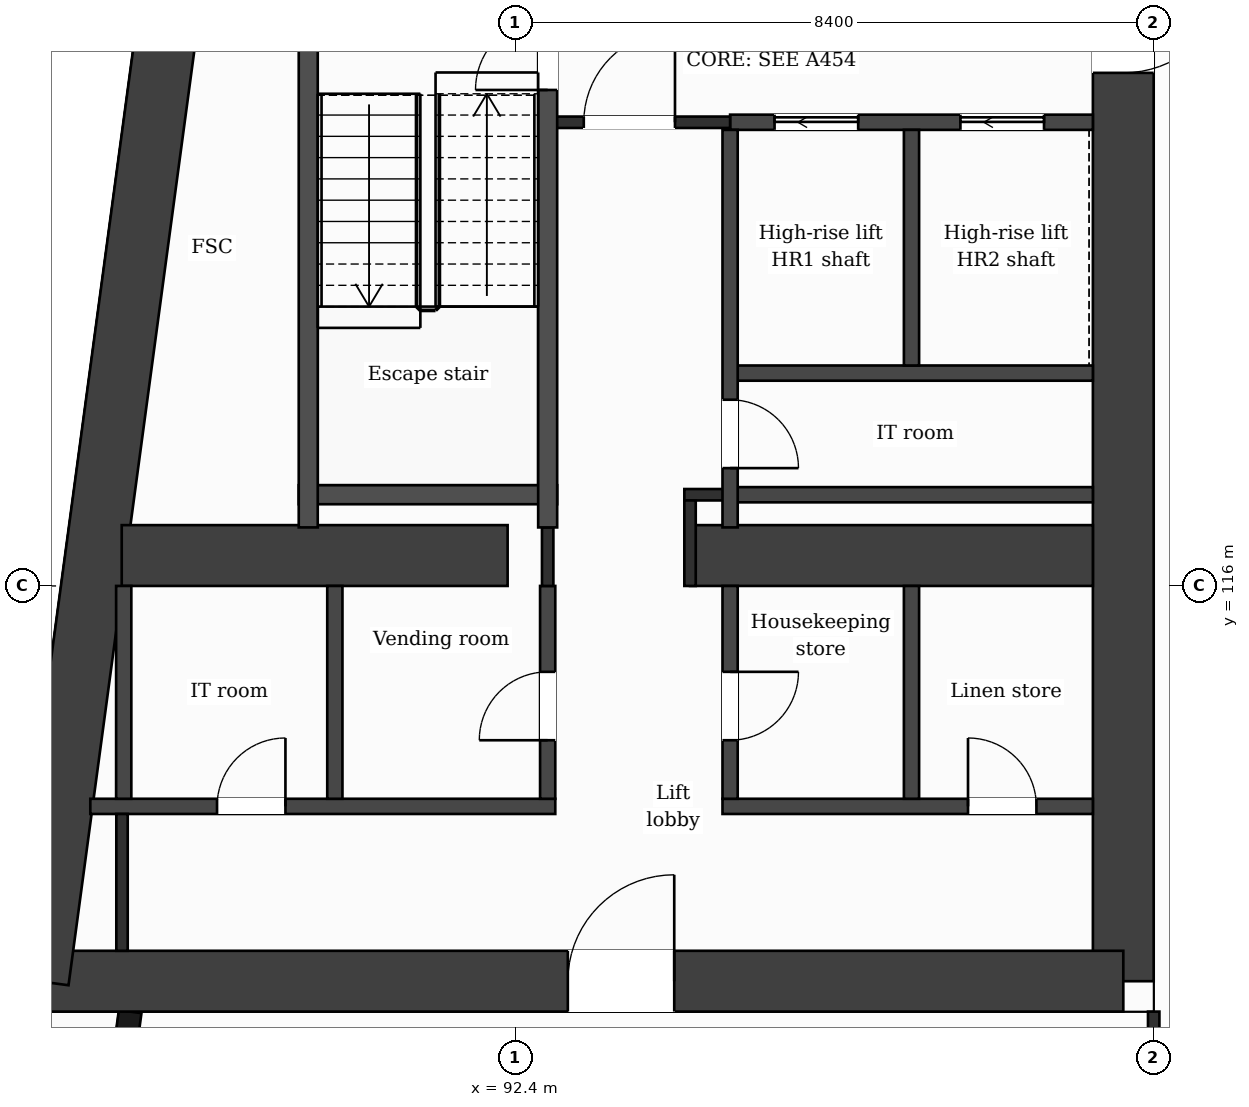
"""IFC4 building model, lengths in metres.
Left out: names, types, materials, properties, quantities, classifications, styles, units other than length and angle.
Written with IfcOpenShell. Run it as: python <this file> out.ifc"""

import sys

from ifc_helpers import new_model, si_unit, direction, frame, frame_2d, origin, place, context, subcontext, project, spatial, rectangle, extrude, element, fill, save


model = new_model("IFC4")
c1 = context("Model", 3, precision=1e-05, world=origin(), true_north=direction((0.0, 1.0)))
c2 = subcontext(c1, "Body", "Model", "MODEL_VIEW")
j1 = project(units=[si_unit("LENGTHUNIT", "METRE"), si_unit("PLANEANGLEUNIT", "RADIAN")], contexts=[c1])
p1 = place(None, origin())
s1 = spatial("IfcSite", under=j1, at=p1, CompositionType="ELEMENT")
p2 = place(p1, origin())
s2 = spatial("IfcBuilding", under=s1, at=p2, CompositionType="ELEMENT")
p3 = place(p2, frame((0.0, 0.0, 220.7)))
s3 = spatial("IfcBuildingStorey", under=s2, at=p3, CompositionType="ELEMENT", Elevation=220.7)
p4 = place(p3, frame((100.4, 132.0, 0.0), z_axis=(0.0, 0.0, 1.0), x_axis=(0.0, -1.0, 0.0)))
e1 = element("IfcWall", 1, at=p4, inside=s3, PredefinedType="SHEAR", context=c2, shape_type="SweptSolid", body=[
    extrude(rectangle(XDim=21.2, YDim=0.8, at=frame_2d((10.6, 0.0))), origin(), (0.0, 0.0, 1.0), 3.7),
])
p5 = place(p4, frame((7.85, 0.0, 0.0)))
e2 = element("IfcOpeningElement", 2, at=p5, cuts=e1, PredefinedType="OPENING", context=c2, shape_type="SweptSolid", body=[
    extrude(rectangle(XDim=1.4, YDim=2.1, at=frame_2d((0.7, 1.05))), frame((0.0, 0.41, 0.0), z_axis=(0.0, -1.0, 0.0), x_axis=(1.0, 0.0, 0.0)), (0.0, 0.0, 1.0), 0.82),
])
p6 = place(p3, frame((100.4, 110.8, 0.0), z_axis=(0.0, 0.0, 1.0), x_axis=(-1.0, 0.0, 0.0)))
e3 = element("IfcWall", 3, at=p6, inside=s3, PredefinedType="SHEAR", context=c2, shape_type="SweptSolid", body=[
    extrude(rectangle(XDim=14.273, YDim=0.8, at=frame_2d((7.137, 0.0))), origin(), (0.0, 0.0, 1.0), 3.7),
])
p7 = place(p6, frame((5.908, 0.0, 0.0)))
e4 = element("IfcOpeningElement", 4, at=p7, cuts=e3, PredefinedType="OPENING", context=c2, shape_type="SweptSolid", body=[
    extrude(rectangle(XDim=1.4, YDim=2.1, at=frame_2d((0.7, 1.05))), frame((0.0, 0.41, 0.0), z_axis=(0.0, -1.0, 0.0), x_axis=(1.0, 0.0, 0.0)), (0.0, 0.0, 1.0), 0.82),
])
p8 = place(p3, frame((86.127, 110.8, 0.0), z_axis=(0.0, 0.0, 1.0), x_axis=(0.133408347329, 0.991061154956, 0.0)))
e5 = element("IfcWall", 5, at=p8, inside=s3, PredefinedType="SHEAR", context=c2, shape_type="SweptSolid", body=[
    extrude(rectangle(XDim=21.391, YDim=0.8, at=frame_2d((10.696, 0.0))), origin(), (0.0, 0.0, 1.0), 3.7),
])
p9 = place(p3, frame((87.223, 116.4, 0.0), z_axis=(0.0, 0.0, 1.0), x_axis=(1.0, 0.0, 0.0)))
e6 = element("IfcWall", 6, at=p9, inside=s3, PredefinedType="SHEAR", context=c2, shape_type="SweptSolid", body=[
    extrude(rectangle(XDim=5.077, YDim=0.8, at=frame_2d((2.539, 0.0))), origin(), (0.0, 0.0, 1.0), 3.7),
])
p10 = place(p3, frame((94.7, 116.4, 0.0), z_axis=(0.0, 0.0, 1.0), x_axis=(1.0, 0.0, 0.0)))
e7 = element("IfcWall", 7, at=p10, inside=s3, PredefinedType="SHEAR", context=c2, shape_type="SweptSolid", body=[
    extrude(rectangle(XDim=5.3, YDim=0.8, at=frame_2d((2.65, 0.0))), origin(), (0.0, 0.0, 1.0), 3.7),
])
p11 = place(p3, frame((87.334, 110.4, 0.0), z_axis=(0.0, 0.0, 1.0), x_axis=(-0.133437175554, -0.991057273915, 0.0)))
e8 = element("IfcWall", 8, at=p11, inside=s3, PredefinedType="SOLIDWALL", context=c2, shape_type="SweptSolid", body=[
    extrude(rectangle(XDim=6.781, YDim=0.3, at=frame_2d((3.39, 0.0))), origin(), (0.0, 0.0, 1.0), 3.38),
])
p12 = place(p11, frame((1.418, 0.0, 0.0)))
e9 = element("IfcOpeningElement", 9, at=p12, cuts=e8, PredefinedType="OPENING", context=c2, shape_type="SweptSolid", body=[
    extrude(rectangle(XDim=1.2, YDim=2.4, at=frame_2d((0.6, 1.2))), frame((0.0, 0.16, 0.0), z_axis=(0.0, -1.0, 0.0), x_axis=(1.0, 0.0, 0.0)), (0.0, 0.0, 1.0), 0.32),
])
p13 = place(p11, frame((4.758, 0.0, 0.9)))
e10 = element("IfcOpeningElement", 10, at=p13, cuts=e8, PredefinedType="OPENING", context=c2, shape_type="SweptSolid", body=[
    extrude(rectangle(XDim=1.2, YDim=2.1, at=frame_2d((0.6, 1.05))), frame((0.0, 0.16, 0.0), z_axis=(0.0, -1.0, 0.0), x_axis=(1.0, 0.0, 0.0)), (0.0, 0.0, 1.0), 0.32),
])
p14 = place(p3, frame((86.81, 113.1, 0.0), z_axis=(0.0, 0.0, 1.0), x_axis=(1.0, 0.0, 0.0)))
e11 = element("IfcWall", 11, at=p14, inside=s3, PredefinedType="PARTITIONING", context=c2, shape_type="SweptSolid", body=[
    extrude(rectangle(XDim=6.117, YDim=0.2, at=frame_2d((3.059, 0.0))), origin(), (0.0, 0.0, 1.0), 3.38),
])
p15 = place(p14, frame((1.667, 0.0, 0.0)))
e12 = element("IfcOpeningElement", 12, at=p15, cuts=e11, PredefinedType="OPENING", context=c2, shape_type="SweptSolid", body=[
    extrude(rectangle(XDim=0.9, YDim=2.1, at=frame_2d((0.45, 1.05))), frame((0.0, 0.11, 0.0), z_axis=(0.0, -1.0, 0.0), x_axis=(1.0, 0.0, 0.0)), (0.0, 0.0, 1.0), 0.22),
])
p16 = place(p3, frame((95.127, 113.1, 0.0), z_axis=(0.0, 0.0, 1.0), x_axis=(1.0, 0.0, 0.0)))
e13 = element("IfcWall", 13, at=p16, inside=s3, PredefinedType="PARTITIONING", context=c2, shape_type="SweptSolid", body=[
    extrude(rectangle(XDim=4.873, YDim=0.2, at=frame_2d((2.437, 0.0))), origin(), (0.0, 0.0, 1.0), 3.38),
])
p17 = place(p16, frame((3.23, 0.0, 0.0)))
e14 = element("IfcOpeningElement", 14, at=p17, cuts=e13, PredefinedType="OPENING", context=c2, shape_type="SweptSolid", body=[
    extrude(rectangle(XDim=0.9, YDim=2.1, at=frame_2d((0.45, 1.05))), frame((0.0, 0.11, 0.0), z_axis=(0.0, -1.0, 0.0), x_axis=(1.0, 0.0, 0.0)), (0.0, 0.0, 1.0), 0.22),
])
p18 = place(p3, frame((95.227, 117.2, 0.0), z_axis=(0.0, 0.0, 1.0), x_axis=(1.0, 0.0, 0.0)))
e15 = element("IfcWall", 15, at=p18, inside=s3, PredefinedType="PARTITIONING", context=c2, shape_type="SweptSolid", body=[
    extrude(rectangle(XDim=4.773, YDim=0.2, at=frame_2d((2.386, 0.0))), origin(), (0.0, 0.0, 1.0), 3.38),
])
p19 = place(p3, frame((94.625, 117.2, 0.0), z_axis=(0.0, 0.0, 1.0), x_axis=(1.0, 0.0, 0.0)))
e16 = element("IfcWall", 16, at=p19, inside=s3, PredefinedType="PARTITIONING", context=c2, shape_type="SweptSolid", body=[
    extrude(rectangle(XDim=0.602, YDim=0.15, at=frame_2d((0.301, 0.0))), origin(), (0.0, 0.0, 1.0), 3.38),
])
p20 = place(p3, frame((89.552, 117.2, 0.0), z_axis=(0.0, 0.0, 1.0), x_axis=(1.0, 0.0, 0.0)))
e17 = element("IfcWall", 17, at=p20, inside=s3, PredefinedType="PARTITIONING", context=c2, shape_type="SweptSolid", body=[
    extrude(rectangle(XDim=3.4, YDim=0.25, at=frame_2d((1.7, 0.0))), origin(), (0.0, 0.0, 1.0), 3.38),
])
p21 = place(p3, frame((95.227, 118.8, 0.0), z_axis=(0.0, 0.0, 1.0), x_axis=(1.0, 0.0, 0.0)))
e18 = element("IfcWall", 18, at=p21, inside=s3, PredefinedType="PARTITIONING", context=c2, shape_type="SweptSolid", body=[
    extrude(rectangle(XDim=4.773, YDim=0.2, at=frame_2d((2.386, 0.0))), origin(), (0.0, 0.0, 1.0), 3.38),
])
p22 = place(p3, frame((95.227, 122.1, 0.0), z_axis=(0.0, 0.0, 1.0), x_axis=(1.0, 0.0, 0.0)))
e19 = element("IfcWall", 19, at=p22, inside=s3, PredefinedType="PARTITIONING", context=c2, shape_type="SweptSolid", body=[
    extrude(rectangle(XDim=4.773, YDim=0.2, at=frame_2d((2.386, 0.0))), origin(), (0.0, 0.0, 1.0), 3.38),
])
p23 = place(p22, frame((0.585, 0.0, 0.0)))
e20 = element("IfcOpeningElement", 20, at=p23, cuts=e19, PredefinedType="OPENING", context=c2, shape_type="SweptSolid", body=[
    extrude(rectangle(XDim=1.1, YDim=2.1, at=frame_2d((0.55, 1.05))), frame((0.0, 0.11, 0.0), z_axis=(0.0, -1.0, 0.0), x_axis=(1.0, 0.0, 0.0)), (0.0, 0.0, 1.0), 0.22),
])
p24 = place(p22, frame((3.03, 0.0, 0.0)))
e21 = element("IfcOpeningElement", 21, at=p24, cuts=e19, PredefinedType="OPENING", context=c2, shape_type="SweptSolid", body=[
    extrude(rectangle(XDim=1.1, YDim=2.1, at=frame_2d((0.55, 1.05))), frame((0.0, 0.11, 0.0), z_axis=(0.0, -1.0, 0.0), x_axis=(1.0, 0.0, 0.0)), (0.0, 0.0, 1.0), 0.22),
])
p25 = place(p3, frame((92.827, 122.1, 0.0), z_axis=(0.0, 0.0, 1.0), x_axis=(1.0, 0.0, 0.0)))
e22 = element("IfcWall", 22, at=p25, inside=s3, PredefinedType="PARTITIONING", context=c2, shape_type="SweptSolid", body=[
    extrude(rectangle(XDim=2.4, YDim=0.15, at=frame_2d((1.2, 0.0))), origin(), (0.0, 0.0, 1.0), 3.38),
])
p26 = place(p25, frame((0.475, 0.0, 0.0)))
e23 = element("IfcOpeningElement", 23, at=p26, cuts=e22, PredefinedType="OPENING", context=c2, shape_type="SweptSolid", body=[
    extrude(rectangle(XDim=1.2, YDim=2.1, at=frame_2d((0.6, 1.05))), frame((0.0, 0.085, 0.0), z_axis=(0.0, -1.0, 0.0), x_axis=(1.0, 0.0, 0.0)), (0.0, 0.0, 1.0), 0.17),
])
p27 = place(p3, frame((87.25, 113.2, 0.0), z_axis=(0.0, 0.0, 1.0), x_axis=(0.0, 1.0, 0.0)))
e24 = element("IfcWall", 24, at=p27, inside=s3, PredefinedType="PARTITIONING", context=c2, shape_type="SweptSolid", body=[
    extrude(rectangle(XDim=2.8, YDim=0.2, at=frame_2d((1.4, 0.0))), origin(), (0.0, 0.0, 1.0), 3.38),
])
p28 = place(p3, frame((87.227, 111.2, 0.0), z_axis=(0.0, 0.0, 1.0), x_axis=(0.0, 1.0, 0.0)))
e25 = element("IfcWall", 25, at=p28, inside=s3, PredefinedType="PARTITIONING", context=c2, shape_type="SweptSolid", body=[
    extrude(rectangle(XDim=1.8, YDim=0.15, at=frame_2d((0.9, 0.0))), origin(), (0.0, 0.0, 1.0), 3.38),
])
p29 = place(p3, frame((89.677, 116.77, 0.0), z_axis=(0.0, 0.0, 1.0), x_axis=(0.0, 1.0, 0.0)))
e26 = element("IfcWall", 26, at=p29, inside=s3, PredefinedType="PARTITIONING", context=c2, shape_type="SweptSolid", body=[
    extrude(rectangle(XDim=7.055, YDim=0.25, at=frame_2d((3.527, 0.0))), origin(), (0.0, 0.0, 1.0), 3.38),
])
p30 = place(p3, frame((90.027, 113.2, 0.0), z_axis=(0.0, 0.0, 1.0), x_axis=(0.0, 1.0, 0.0)))
e27 = element("IfcWall", 27, at=p30, inside=s3, PredefinedType="PARTITIONING", context=c2, shape_type="SweptSolid", body=[
    extrude(rectangle(XDim=2.8, YDim=0.2, at=frame_2d((1.4, 0.0))), origin(), (0.0, 0.0, 1.0), 3.38),
])
p31 = place(p3, frame((92.827, 113.2, 0.0), z_axis=(0.0, 0.0, 1.0), x_axis=(0.0, 1.0, 0.0)))
e28 = element("IfcWall", 28, at=p31, inside=s3, PredefinedType="PARTITIONING", context=c2, shape_type="SweptSolid", body=[
    extrude(rectangle(XDim=2.8, YDim=0.2, at=frame_2d((1.4, 0.0))), origin(), (0.0, 0.0, 1.0), 3.38),
])
p32 = place(p31, frame((0.77, 0.0, 0.0)))
e29 = element("IfcOpeningElement", 29, at=p32, cuts=e28, PredefinedType="OPENING", context=c2, shape_type="SweptSolid", body=[
    extrude(rectangle(XDim=0.9, YDim=2.1, at=frame_2d((0.45, 1.05))), frame((0.0, 0.11, 0.0), z_axis=(0.0, -1.0, 0.0), x_axis=(1.0, 0.0, 0.0)), (0.0, 0.0, 1.0), 0.22),
])
p33 = place(p3, frame((92.827, 116.0, 0.0), z_axis=(0.0, 0.0, 1.0), x_axis=(0.0, 1.0, 0.0)))
e30 = element("IfcWall", 30, at=p33, inside=s3, PredefinedType="PARTITIONING", context=c2, shape_type="SweptSolid", body=[
    extrude(rectangle(XDim=0.77, YDim=0.15, at=frame_2d((0.385, 0.0))), origin(), (0.0, 0.0, 1.0), 3.38),
])
p34 = place(p3, frame((92.827, 116.77, 0.0), z_axis=(0.0, 0.0, 1.0), x_axis=(0.0, 1.0, 0.0)))
e31 = element("IfcWall", 31, at=p34, inside=s3, PredefinedType="PARTITIONING", context=c2, shape_type="SweptSolid", body=[
    extrude(rectangle(XDim=7.055, YDim=0.25, at=frame_2d((3.527, 0.0))), origin(), (0.0, 0.0, 1.0), 3.38),
])
p35 = place(p34, frame((5.755, 0.0, 0.0)))
e32 = element("IfcOpeningElement", 32, at=p35, cuts=e31, PredefinedType="OPENING", context=c2, shape_type="SweptSolid", body=[
    extrude(rectangle(XDim=0.95, YDim=2.1, at=frame_2d((0.475, 1.05))), frame((0.0, 0.135, 0.0), z_axis=(0.0, -1.0, 0.0), x_axis=(1.0, 0.0, 0.0)), (0.0, 0.0, 1.0), 0.27),
])
p36 = place(p3, frame((94.7, 116.0, 0.0), z_axis=(0.0, 0.0, 1.0), x_axis=(0.0, 1.0, 0.0)))
e33 = element("IfcWall", 33, at=p36, inside=s3, PredefinedType="PARTITIONING", context=c2, shape_type="SweptSolid", body=[
    extrude(rectangle(XDim=1.125, YDim=0.15, at=frame_2d((0.562, 0.0))), origin(), (0.0, 0.0, 1.0), 3.38),
])
p37 = place(p3, frame((95.227, 113.2, 0.0), z_axis=(0.0, 0.0, 1.0), x_axis=(0.0, 1.0, 0.0)))
e34 = element("IfcWall", 34, at=p37, inside=s3, PredefinedType="PARTITIONING", context=c2, shape_type="SweptSolid", body=[
    extrude(rectangle(XDim=2.8, YDim=0.2, at=frame_2d((1.4, 0.0))), origin(), (0.0, 0.0, 1.0), 3.38),
])
p38 = place(p37, frame((0.77, 0.0, 0.0)))
e35 = element("IfcOpeningElement", 35, at=p38, cuts=e34, PredefinedType="OPENING", context=c2, shape_type="SweptSolid", body=[
    extrude(rectangle(XDim=0.9, YDim=2.1, at=frame_2d((0.45, 1.05))), frame((0.0, 0.11, 0.0), z_axis=(0.0, -1.0, 0.0), x_axis=(1.0, 0.0, 0.0)), (0.0, 0.0, 1.0), 0.22),
])
p39 = place(p3, frame((95.227, 116.77, 0.0), z_axis=(0.0, 0.0, 1.0), x_axis=(0.0, 1.0, 0.0)))
e36 = element("IfcWall", 36, at=p39, inside=s3, PredefinedType="PARTITIONING", context=c2, shape_type="SweptSolid", body=[
    extrude(rectangle(XDim=5.23, YDim=0.2, at=frame_2d((2.615, 0.0))), origin(), (0.0, 0.0, 1.0), 3.38),
])
p40 = place(p39, frame((0.78, 0.0, 0.0)))
e37 = element("IfcOpeningElement", 37, at=p40, cuts=e36, PredefinedType="OPENING", context=c2, shape_type="SweptSolid", body=[
    extrude(rectangle(XDim=0.9, YDim=2.1, at=frame_2d((0.45, 1.05))), frame((0.0, 0.11, 0.0), z_axis=(0.0, -1.0, 0.0), x_axis=(1.0, 0.0, 0.0)), (0.0, 0.0, 1.0), 0.22),
])
p41 = place(p3, frame((97.614, 113.2, 0.0), z_axis=(0.0, 0.0, 1.0), x_axis=(0.0, 1.0, 0.0)))
e38 = element("IfcWall", 38, at=p41, inside=s3, PredefinedType="PARTITIONING", context=c2, shape_type="SweptSolid", body=[
    extrude(rectangle(XDim=2.8, YDim=0.2, at=frame_2d((1.4, 0.0))), origin(), (0.0, 0.0, 1.0), 3.38),
])
p42 = place(p3, frame((97.614, 118.9, 0.0), z_axis=(0.0, 0.0, 1.0), x_axis=(0.0, 1.0, 0.0)))
e39 = element("IfcWall", 39, at=p42, inside=s3, PredefinedType="PARTITIONING", context=c2, shape_type="SweptSolid", body=[
    extrude(rectangle(XDim=3.1, YDim=0.2, at=frame_2d((1.55, 0.0))), origin(), (0.0, 0.0, 1.0), 3.38),
])
p43 = place(p3, frame((100.8, 109.075, 0.0), z_axis=(0.0, 0.0, 1.0), x_axis=(0.0, 1.0, 0.0)))
e40 = element("IfcWall", 40, at=p43, inside=s3, PredefinedType="PARTITIONING", context=c2, shape_type="SweptSolid", body=[
    extrude(rectangle(XDim=1.325, YDim=0.15, at=frame_2d((0.663, 0.0))), origin(), (0.0, 0.0, 1.0), 3.38),
])
p44 = place(p26, origin())
e41 = element("IfcDoor", 41, at=p44, inside=s3, OperationType="SINGLE_SWING_RIGHT", PredefinedType="DOOR", context=c2, shape_type="SweptSolid", body=[
    extrude(rectangle(XDim=1.2, YDim=2.1, at=frame_2d((0.6, 1.05))), frame((0.0, 0.025, 0.0), z_axis=(0.0, -1.0, 0.0), x_axis=(1.0, 0.0, 0.0)), (0.0, 0.0, 1.0), 0.05),
])
fill(e23, e41)
p45 = place(p23, origin())
e42 = element("IfcDoor", 42, at=p45, inside=s3, OperationType="SLIDING_TO_LEFT", PredefinedType="DOOR", context=c2, shape_type="SweptSolid", body=[
    extrude(rectangle(XDim=1.1, YDim=2.1, at=frame_2d((0.55, 1.05))), frame((0.0, 0.025, 0.0), z_axis=(0.0, -1.0, 0.0), x_axis=(1.0, 0.0, 0.0)), (0.0, 0.0, 1.0), 0.05),
])
fill(e20, e42)
p46 = place(p24, origin())
e43 = element("IfcDoor", 43, at=p46, inside=s3, OperationType="SLIDING_TO_LEFT", PredefinedType="DOOR", context=c2, shape_type="SweptSolid", body=[
    extrude(rectangle(XDim=1.1, YDim=2.1, at=frame_2d((0.55, 1.05))), frame((0.0, 0.025, 0.0), z_axis=(0.0, -1.0, 0.0), x_axis=(1.0, 0.0, 0.0)), (0.0, 0.0, 1.0), 0.05),
])
fill(e21, e43)
p47 = place(p35, origin())
e44 = element("IfcDoor", 44, at=p47, inside=s3, OperationType="SINGLE_SWING_LEFT", PredefinedType="DOOR", context=c2, shape_type="SweptSolid", body=[
    extrude(rectangle(XDim=0.95, YDim=2.1, at=frame_2d((0.475, 1.05))), frame((0.0, 0.025, 0.0), z_axis=(0.0, -1.0, 0.0), x_axis=(1.0, 0.0, 0.0)), (0.0, 0.0, 1.0), 0.05),
])
fill(e32, e44)
p48 = place(p40, origin())
e45 = element("IfcDoor", 45, at=p48, inside=s3, OperationType="SINGLE_SWING_LEFT", PredefinedType="DOOR", context=c2, shape_type="SweptSolid", body=[
    extrude(rectangle(XDim=0.9, YDim=2.1, at=frame_2d((0.45, 1.05))), frame((0.0, 0.025, 0.0), z_axis=(0.0, -1.0, 0.0), x_axis=(1.0, 0.0, 0.0)), (0.0, 0.0, 1.0), 0.05),
])
fill(e37, e45)
p49 = place(p15, origin())
e46 = element("IfcDoor", 46, at=p49, inside=s3, OperationType="SINGLE_SWING_RIGHT", PredefinedType="DOOR", context=c2, shape_type="SweptSolid", body=[
    extrude(rectangle(XDim=0.9, YDim=2.1, at=frame_2d((0.45, 1.05))), frame((0.0, 0.025, 0.0), z_axis=(0.0, -1.0, 0.0), x_axis=(1.0, 0.0, 0.0)), (0.0, 0.0, 1.0), 0.05),
])
fill(e12, e46)
p50 = place(p32, origin())
e47 = element("IfcDoor", 47, at=p50, inside=s3, OperationType="SINGLE_SWING_LEFT", PredefinedType="DOOR", context=c2, shape_type="SweptSolid", body=[
    extrude(rectangle(XDim=0.9, YDim=2.1, at=frame_2d((0.45, 1.05))), frame((0.0, 0.025, 0.0), z_axis=(0.0, -1.0, 0.0), x_axis=(1.0, 0.0, 0.0)), (0.0, 0.0, 1.0), 0.05),
])
fill(e29, e47)
p51 = place(p38, origin())
e48 = element("IfcDoor", 48, at=p51, inside=s3, OperationType="SINGLE_SWING_RIGHT", PredefinedType="DOOR", context=c2, shape_type="SweptSolid", body=[
    extrude(rectangle(XDim=0.9, YDim=2.1, at=frame_2d((0.45, 1.05))), frame((0.0, 0.025, 0.0), z_axis=(0.0, -1.0, 0.0), x_axis=(1.0, 0.0, 0.0)), (0.0, 0.0, 1.0), 0.05),
])
fill(e35, e48)
p52 = place(p17, origin())
e49 = element("IfcDoor", 49, at=p52, inside=s3, OperationType="SINGLE_SWING_LEFT", PredefinedType="DOOR", context=c2, shape_type="SweptSolid", body=[
    extrude(rectangle(XDim=0.9, YDim=2.1, at=frame_2d((0.45, 1.05))), frame((0.0, 0.025, 0.0), z_axis=(0.0, -1.0, 0.0), x_axis=(1.0, 0.0, 0.0)), (0.0, 0.0, 1.0), 0.05),
])
fill(e14, e49)
p53 = place(p7, origin())
e50 = element("IfcDoor", 50, at=p53, inside=s3, OperationType="SINGLE_SWING_LEFT", PredefinedType="DOOR", context=c2, shape_type="SweptSolid", body=[
    extrude(rectangle(XDim=1.4, YDim=2.1, at=frame_2d((0.7, 1.05))), frame((0.0, 0.025, 0.0), z_axis=(0.0, -1.0, 0.0), x_axis=(1.0, 0.0, 0.0)), (0.0, 0.0, 1.0), 0.05),
])
fill(e4, e50)
p54 = place(p5, origin())
e51 = element("IfcDoor", 51, at=p54, inside=s3, OperationType="SINGLE_SWING_LEFT", PredefinedType="DOOR", context=c2, shape_type="SweptSolid", body=[
    extrude(rectangle(XDim=1.4, YDim=2.1, at=frame_2d((0.7, 1.05))), frame((0.0, 0.025, 0.0), z_axis=(0.0, -1.0, 0.0), x_axis=(1.0, 0.0, 0.0)), (0.0, 0.0, 1.0), 0.05),
])
fill(e2, e51)
save(model, sys.argv[1])
